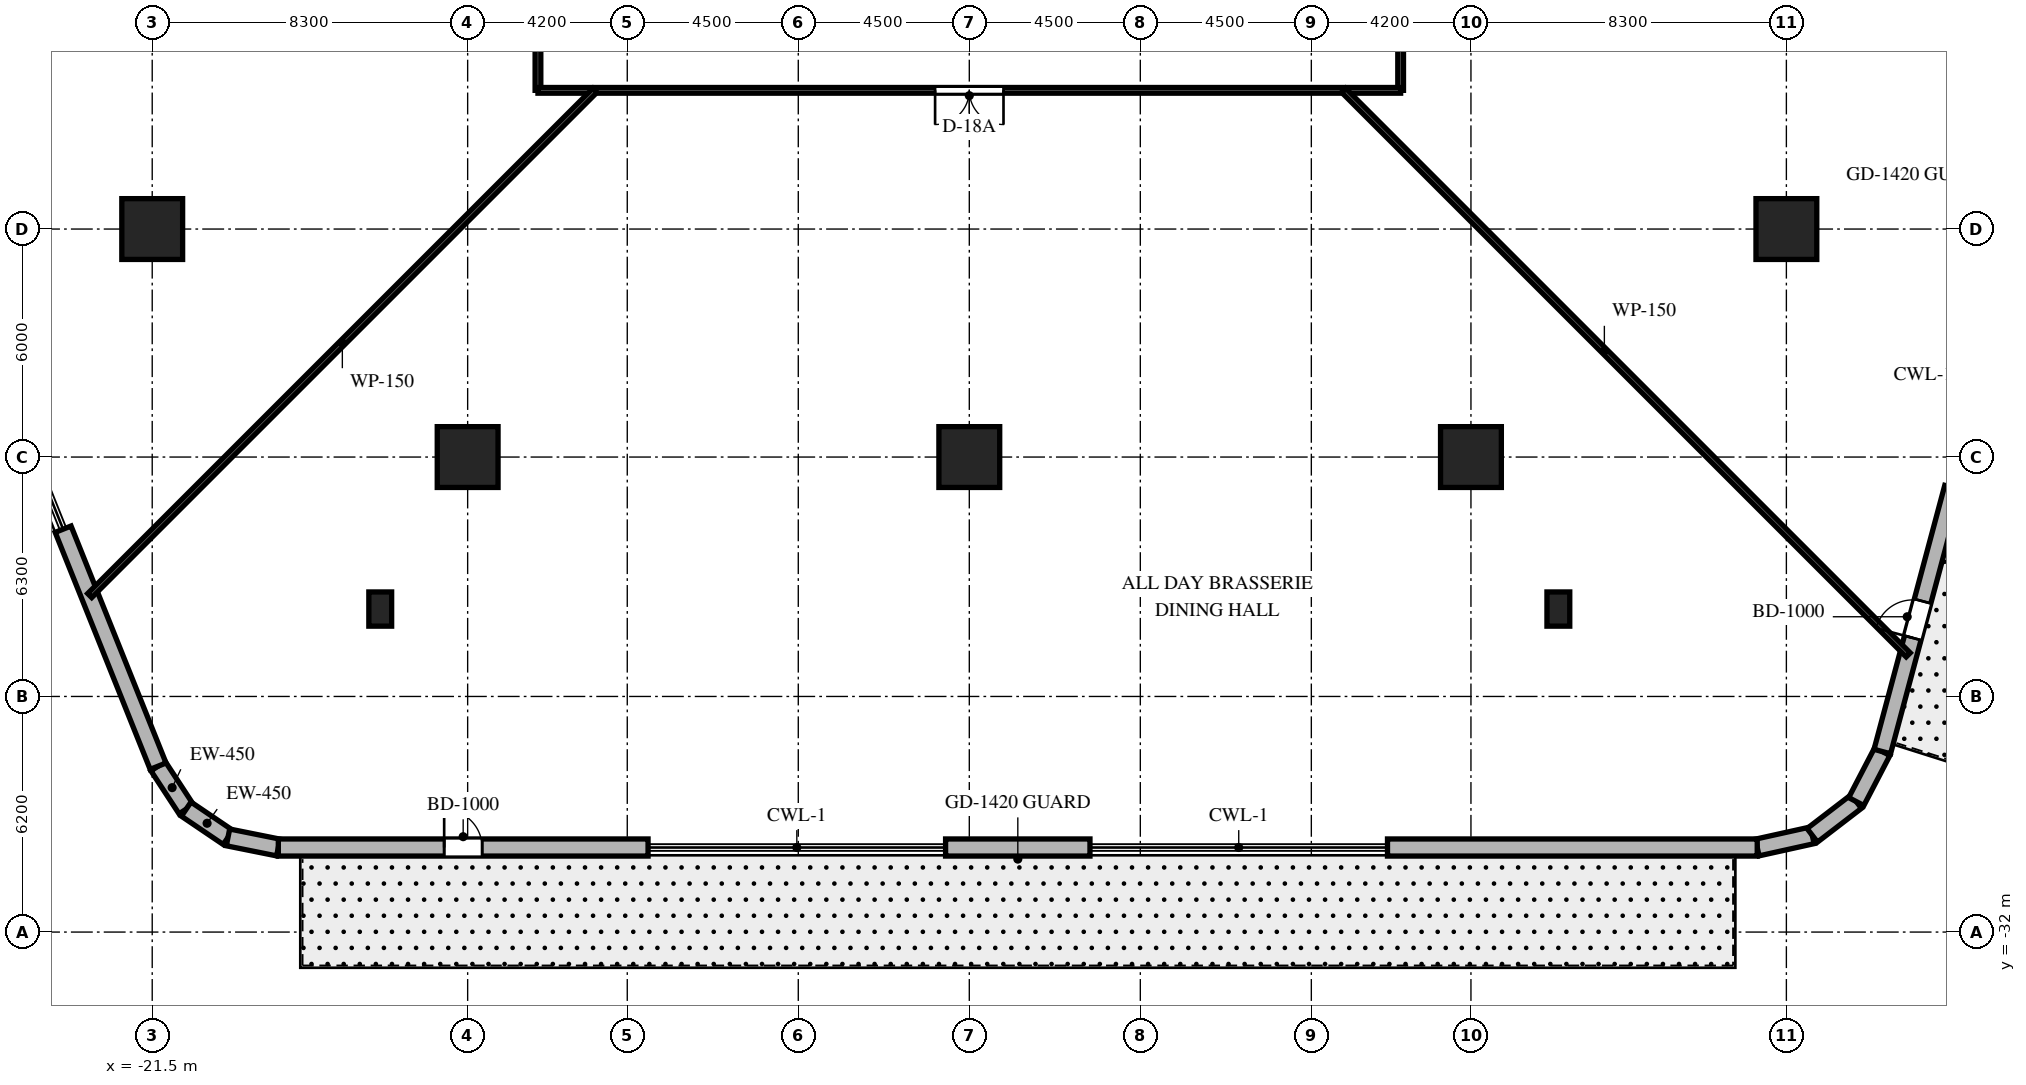
"""IFC4 building model, lengths in metres.
Left out: names, types, materials, properties, quantities, classifications, styles, units other than length and angle.
Written with IfcOpenShell. Run it as: python <this file> out.ifc"""

import sys

from ifc_helpers import new_model, si_unit, direction, frame, frame_2d, origin, origin_2d, place, context, subcontext, project, spatial, rectangle, extrude, element, fill, save


model = new_model("IFC4")
c1 = context("Model", 3, precision=1e-05, world=origin(), true_north=direction((0.0, 1.0)))
c2 = subcontext(c1, "Body", "Model", "MODEL_VIEW")
j1 = project(units=[si_unit("LENGTHUNIT", "METRE"), si_unit("PLANEANGLEUNIT", "RADIAN")], contexts=[c1])
p1 = place(None, origin())
s1 = spatial("IfcSite", under=j1, at=p1, CompositionType="ELEMENT")
p2 = place(p1, origin())
s2 = spatial("IfcBuilding", under=s1, at=p2, CompositionType="ELEMENT")
p3 = place(p2, frame((0.0, 0.0, 6.0)))
s3 = spatial("IfcBuildingStorey", under=s2, at=p3, CompositionType="ELEMENT", Elevation=6.0)
for number, where, z_axis, x_axis in (
    (1, (-21.5, -13.5, 0.0), (0.0, 0.0, 1.0), (1.0, 0.0, 0.0)),
    (2, (21.5, -13.5, 0.0), (0.0, 0.0, 1.0), (1.0, 0.0, 0.0)),
    (3, (-13.2, -19.5, 0.0), (0.0, 0.0, 1.0), (1.0, 0.0, 0.0)),
    (4, (13.2, -19.5, 0.0), (0.0, 0.0, 1.0), (1.0, 0.0, 0.0)),
    (5, (0.0, -19.5, 0.0), (0.0, 0.0, 1.0), (1.0, 0.0, 0.0)),
):
    element("IfcColumn", number, at=place(p3, frame(where, z_axis=z_axis, x_axis=x_axis)), inside=s3, PredefinedType="COLUMN", context=c2, shape_type="SweptSolid", body=[
        extrude(rectangle(XDim=1.6, YDim=1.6, at=origin_2d()), origin(), (0.0, 0.0, 1.0), 5.4),
    ])
for number, where, z_axis, x_axis in (
    (6, (-15.5, -23.5, 0.0), (0.0, 0.0, 1.0), (1.0, 0.0, 0.0)),
    (7, (15.5, -23.5, 0.0), (0.0, 0.0, 1.0), (1.0, 0.0, 0.0)),
):
    element("IfcColumn", number, at=place(p3, frame(where, z_axis=z_axis, x_axis=x_axis)), inside=s3, PredefinedType="PILASTER", context=c2, shape_type="SweptSolid", body=[
        extrude(rectangle(XDim=0.6, YDim=0.9, at=origin_2d()), origin(), (0.0, 0.0, 1.0), 5.4),
    ])
p4 = place(p3, frame((-21.345, -27.635, 0.0), z_axis=(0.0, 0.0, 1.0), x_axis=(0.547463611757, -0.836829489085, 0.0)))
e8 = element("IfcWall", 8, at=p4, inside=s3, PredefinedType="SOLIDWALL", context=c2, shape_type="SweptSolid", body=[
    extrude(rectangle(XDim=1.351, YDim=0.45, at=frame_2d((0.675, 0.0))), origin(), (0.0, 0.0, 1.0), 4.05),
])
p5 = place(p3, frame((-20.606, -28.765, 0.0), z_axis=(0.0, 0.0, 1.0), x_axis=(0.82832607687, -0.560246294389, 0.0)))
e9 = element("IfcWall", 9, at=p5, inside=s3, PredefinedType="SOLIDWALL", context=c2, shape_type="SweptSolid", body=[
    extrude(rectangle(XDim=1.328, YDim=0.45, at=frame_2d((0.664, 0.0))), origin(), (0.0, 0.0, 1.0), 4.05),
])
p6 = place(p3, frame((-19.506, -29.509, 0.0), z_axis=(0.0, 0.0, 1.0), x_axis=(0.98039950709, -0.19701981245, 0.0)))
e10 = element("IfcWall", 10, at=p6, inside=s3, PredefinedType="SOLIDWALL", context=c2, shape_type="SweptSolid", body=[
    extrude(rectangle(XDim=1.351, YDim=0.45, at=frame_2d((0.675, 0.0))), origin(), (0.0, 0.0, 1.0), 4.05),
])
p7 = place(p3, frame((20.733, -29.775, 0.0), z_axis=(0.0, 0.0, 1.0), x_axis=(0.976314642779, 0.21635553678, 0.0)))
e11 = element("IfcWall", 11, at=p7, inside=s3, PredefinedType="SOLIDWALL", context=c2, shape_type="SweptSolid", body=[
    extrude(rectangle(XDim=1.484, YDim=0.45, at=frame_2d((0.742, 0.0))), origin(), (0.0, 0.0, 1.0), 4.05),
])
p8 = place(p3, frame((22.182, -29.454, 0.0), z_axis=(0.0, 0.0, 1.0), x_axis=(0.793363842704, 0.608747741754, 0.0)))
e12 = element("IfcWall", 12, at=p8, inside=s3, PredefinedType="SOLIDWALL", context=c2, shape_type="SweptSolid", body=[
    extrude(rectangle(XDim=1.459, YDim=0.45, at=frame_2d((0.729, 0.0))), origin(), (0.0, 0.0, 1.0), 4.05),
])
p9 = place(p3, frame((23.339, -28.566, 0.0), z_axis=(0.0, 0.0, 1.0), x_axis=(0.461699810705, 0.887036236461, 0.0)))
e13 = element("IfcWall", 13, at=p9, inside=s3, PredefinedType="SOLIDWALL", context=c2, shape_type="SweptSolid", body=[
    extrude(rectangle(XDim=1.484, YDim=0.45, at=frame_2d((0.742, 0.0))), origin(), (0.0, 0.0, 1.0), 4.05),
])
p10 = place(p3, frame((-18.182, -29.775, 0.0), z_axis=(0.0, 0.0, 1.0), x_axis=(1.0, 0.0, 0.0)))
e14 = element("IfcWall", 14, at=p10, inside=s3, PredefinedType="SOLIDWALL", context=c2, shape_type="SweptSolid", body=[
    extrude(rectangle(XDim=9.729, YDim=0.45, at=frame_2d((4.865, 0.0))), origin(), (0.0, 0.0, 1.0), 4.05),
])
p11 = place(p10, frame((4.364, 0.0, 0.0)))
e15 = element("IfcOpeningElement", 15, at=p11, cuts=e14, PredefinedType="OPENING", context=c2, shape_type="SweptSolid", body=[
    extrude(rectangle(XDim=1.0, YDim=2.15, at=frame_2d((0.5, 1.075))), frame((0.0, 0.235, 0.0), z_axis=(0.0, -1.0, 0.0), x_axis=(1.0, 0.0, 0.0)), (0.0, 0.0, 1.0), 0.47),
])
p12 = place(p3, frame((-0.624, -29.775, 0.0), z_axis=(0.0, 0.0, 1.0), x_axis=(1.0, 0.0, 0.0)))
e16 = element("IfcWall", 16, at=p12, inside=s3, PredefinedType="SOLIDWALL", context=c2, shape_type="SweptSolid", body=[
    extrude(rectangle(XDim=3.799, YDim=0.45, at=frame_2d((1.899, 0.0))), origin(), (0.0, 0.0, 1.0), 4.05),
])
p13 = place(p3, frame((11.004, -29.775, 0.0), z_axis=(0.0, 0.0, 1.0), x_axis=(1.0, 0.0, 0.0)))
e17 = element("IfcWall", 17, at=p13, inside=s3, PredefinedType="SOLIDWALL", context=c2, shape_type="SweptSolid", body=[
    extrude(rectangle(XDim=9.729, YDim=0.45, at=frame_2d((4.864, 0.0))), origin(), (0.0, 0.0, 1.0), 4.05),
])
p14 = place(p3, frame((24.024, -27.25, 0.0), z_axis=(0.0, 0.0, 1.0), x_axis=(0.25880339056, 0.965930020775, 0.0)))
e18 = element("IfcWall", 18, at=p14, inside=s3, PredefinedType="SOLIDWALL", context=c2, shape_type="SweptSolid", body=[
    extrude(rectangle(XDim=7.192, YDim=0.45, at=frame_2d((3.596, 0.0))), origin(), (0.0, 0.0, 1.0), 4.05),
])
p15 = place(p14, frame((3.096, 0.0, 0.0)))
e19 = element("IfcOpeningElement", 19, at=p15, cuts=e18, PredefinedType="OPENING", context=c2, shape_type="SweptSolid", body=[
    extrude(rectangle(XDim=1.0, YDim=2.15, at=frame_2d((0.5, 1.075))), frame((0.0, 0.235, 0.0), z_axis=(0.0, -1.0, 0.0), x_axis=(1.0, 0.0, 0.0)), (0.0, 0.0, 1.0), 0.47),
])
p16 = place(p3, frame((-23.844, -21.398, 0.0), z_axis=(0.0, 0.0, 1.0), x_axis=(0.37196701808, -0.928245946644, 0.0)))
e20 = element("IfcWall", 20, at=p16, inside=s3, PredefinedType="SOLIDWALL", context=c2, shape_type="SweptSolid", body=[
    extrude(rectangle(XDim=6.719, YDim=0.45, at=frame_2d((3.359, 0.0))), origin(), (0.0, 0.0, 1.0), 4.05),
])
p17 = place(p3, frame((-11.35, -9.85, 0.0), z_axis=(0.0, 0.0, 1.0), x_axis=(0.0, 1.0, 0.0)))
e21 = element("IfcWall", 21, at=p17, inside=s3, PredefinedType="PARTITIONING", context=c2, shape_type="SweptSolid", body=[
    extrude(rectangle(XDim=19.7, YDim=0.15, at=frame_2d((9.85, 0.0))), origin(), (0.0, 0.0, 1.0), 4.122),
])
p18 = place(p17, frame((9.35, 0.0, 0.0)))
e22 = element("IfcOpeningElement", 22, at=p18, cuts=e21, PredefinedType="OPENING", context=c2, shape_type="SweptSolid", body=[
    extrude(rectangle(XDim=1.0, YDim=2.03, at=frame_2d((0.5, 1.015))), frame((0.0, 0.085, 0.0), z_axis=(0.0, -1.0, 0.0), x_axis=(1.0, 0.0, 0.0)), (0.0, 0.0, 1.0), 0.17),
])
p19 = place(p3, frame((11.35, 9.85, 0.0), z_axis=(0.0, 0.0, 1.0), x_axis=(0.0, -1.0, 0.0)))
e23 = element("IfcWall", 23, at=p19, inside=s3, PredefinedType="PARTITIONING", context=c2, shape_type="SweptSolid", body=[
    extrude(rectangle(XDim=19.7, YDim=0.15, at=frame_2d((9.85, 0.0))), origin(), (0.0, 0.0, 1.0), 4.122),
])
p20 = place(p19, frame((2.1, 0.0, 0.0)))
e24 = element("IfcOpeningElement", 24, at=p20, cuts=e23, PredefinedType="OPENING", context=c2, shape_type="SweptSolid", body=[
    extrude(rectangle(XDim=0.9, YDim=2.03, at=frame_2d((0.45, 1.015))), frame((0.0, 0.085, 0.0), z_axis=(0.0, -1.0, 0.0), x_axis=(1.0, 0.0, 0.0)), (0.0, 0.0, 1.0), 0.17),
])
p21 = place(p19, frame((15.628, 0.0, 0.0)))
e25 = element("IfcOpeningElement", 25, at=p21, cuts=e23, PredefinedType="OPENING", context=c2, shape_type="SweptSolid", body=[
    extrude(rectangle(XDim=1.8, YDim=2.2, at=frame_2d((0.9, 1.1))), frame((0.0, 0.085, 0.0), z_axis=(0.0, -1.0, 0.0), x_axis=(1.0, 0.0, 0.0)), (0.0, 0.0, 1.0), 0.17),
])
p22 = place(p3, frame((11.35, -9.85, 0.0), z_axis=(0.0, 0.0, 1.0), x_axis=(-1.0, 0.0, 0.0)))
e26 = element("IfcWall", 26, at=p22, inside=s3, PredefinedType="PARTITIONING", context=c2, shape_type="SweptSolid", body=[
    extrude(rectangle(XDim=22.7, YDim=0.15, at=frame_2d((11.35, 0.0))), origin(), (0.0, 0.0, 1.0), 4.122),
])
p23 = place(p22, frame((10.45, 0.0, 0.0)))
e27 = element("IfcOpeningElement", 27, at=p23, cuts=e26, PredefinedType="OPENING", context=c2, shape_type="SweptSolid", body=[
    extrude(rectangle(XDim=1.8, YDim=2.2, at=frame_2d((0.9, 1.1))), frame((0.0, 0.085, 0.0), z_axis=(0.0, -1.0, 0.0), x_axis=(1.0, 0.0, 0.0)), (0.0, 0.0, 1.0), 0.17),
])
p24 = place(p3, frame((-9.85, -9.85, 0.0), z_axis=(0.0, 0.0, 1.0), x_axis=(-0.707106781187, -0.707106781187, 0.0)))
e28 = element("IfcWall", 28, at=p24, inside=s3, PredefinedType="PARTITIONING", context=c2, shape_type="SweptSolid", body=[
    extrude(rectangle(XDim=18.801, YDim=0.15, at=frame_2d((9.401, 0.0))), origin(), (0.0, 0.0, 1.0), 4.214),
])
p25 = place(p3, frame((9.85, -9.85, 0.0), z_axis=(0.0, 0.0, 1.0), x_axis=(0.707106781187, -0.707106781187, 0.0)))
e29 = element("IfcWall", 29, at=p25, inside=s3, PredefinedType="PARTITIONING", context=c2, shape_type="SweptSolid", body=[
    extrude(rectangle(XDim=21.009, YDim=0.15, at=frame_2d((10.504, 0.0))), origin(), (0.0, 0.0, 1.0), 4.07),
])
p26 = place(p11, origin())
e30 = element("IfcDoor", 30, at=p26, inside=s3, OperationType="SINGLE_SWING_LEFT", PredefinedType="DOOR", context=c2, shape_type="SweptSolid", body=[
    extrude(rectangle(XDim=1.0, YDim=2.15, at=frame_2d((0.5, 1.075))), frame((0.0, 0.025, 0.0), z_axis=(0.0, -1.0, 0.0), x_axis=(1.0, 0.0, 0.0)), (0.0, 0.0, 1.0), 0.05),
])
fill(e15, e30)
p27 = place(p15, origin())
e31 = element("IfcDoor", 31, at=p27, inside=s3, OperationType="SINGLE_SWING_LEFT", PredefinedType="DOOR", context=c2, shape_type="SweptSolid", body=[
    extrude(rectangle(XDim=1.0, YDim=2.15, at=frame_2d((0.5, 1.075))), frame((0.0, 0.025, 0.0), z_axis=(0.0, -1.0, 0.0), x_axis=(1.0, 0.0, 0.0)), (0.0, 0.0, 1.0), 0.05),
])
fill(e19, e31)
p28 = place(p23, origin())
e32 = element("IfcDoor", 32, at=p28, inside=s3, OperationType="DOUBLE_SWING_LEFT", PredefinedType="DOOR", context=c2, shape_type="SweptSolid", body=[
    extrude(rectangle(XDim=1.8, YDim=2.2, at=frame_2d((0.9, 1.1))), frame((0.0, 0.025, 0.0), z_axis=(0.0, -1.0, 0.0), x_axis=(1.0, 0.0, 0.0)), (0.0, 0.0, 1.0), 0.05),
])
fill(e27, e32)
save(model, sys.argv[1])
